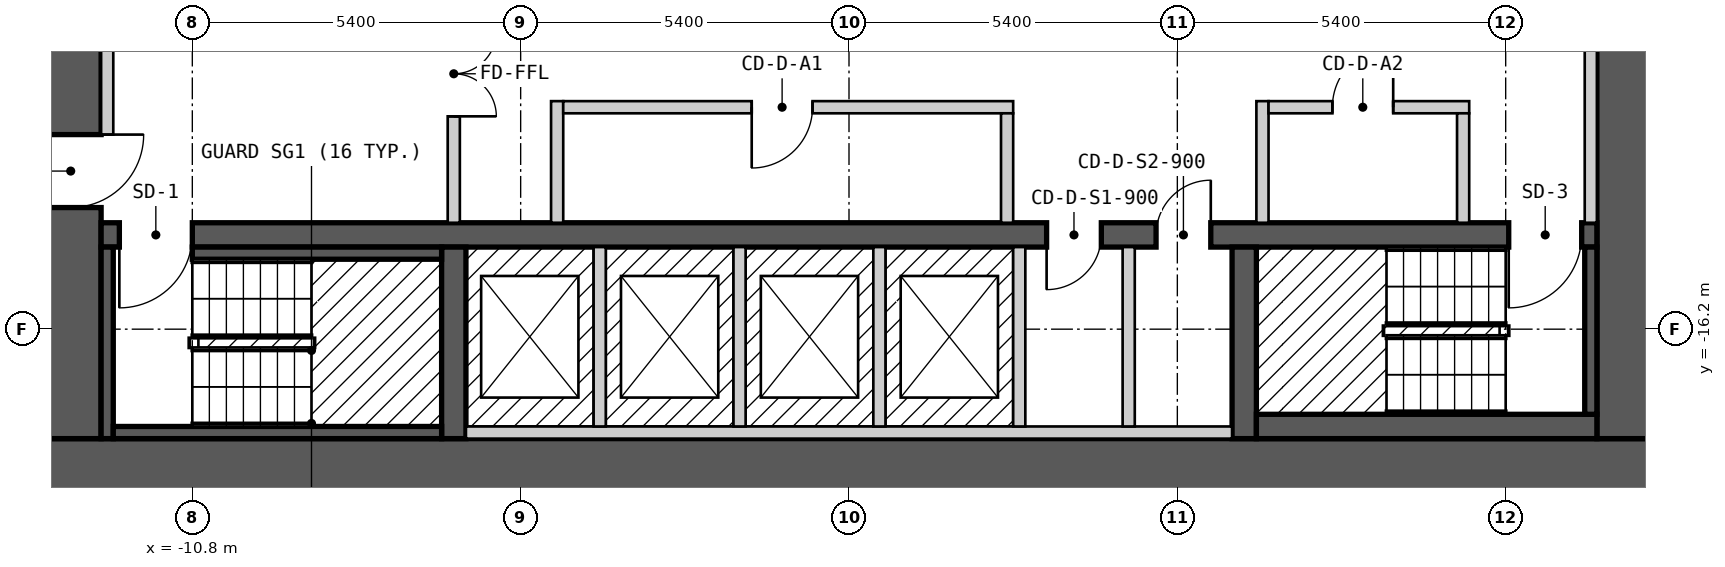
"""IFC4 building model, lengths in metres.
Left out: names, types, materials, properties, quantities, classifications, styles, units other than length and angle.
Written with IfcOpenShell. Run it as: python <this file> out.ifc"""

import sys

from ifc_helpers import new_model, si_unit, direction, frame, frame_2d, origin, place, context, subcontext, project, spatial, rectangle, extrude, element, fill, save


model = new_model("IFC4")
c1 = context("Model", 3, precision=1e-05, world=origin(), true_north=direction((0.0, 1.0)))
c2 = subcontext(c1, "Body", "Model", "MODEL_VIEW")
j1 = project(units=[si_unit("LENGTHUNIT", "METRE"), si_unit("PLANEANGLEUNIT", "RADIAN")], contexts=[c1])
p1 = place(None, origin())
s1 = spatial("IfcSite", under=j1, at=p1, CompositionType="ELEMENT")
p2 = place(p1, origin())
s2 = spatial("IfcBuilding", under=s1, at=p2, CompositionType="ELEMENT")
p3 = place(p2, frame((0.0, 0.0, 84.0)))
s3 = spatial("IfcBuildingStorey", under=s2, at=p3, CompositionType="ELEMENT", Elevation=84.0)
p4 = place(p3, frame((-13.3, -18.5, 0.0), z_axis=(0.0, 0.0, 1.0), x_axis=(1.0, 0.0, 0.0)))
e1 = element("IfcWall", 1, at=p4, inside=s3, PredefinedType="SHEAR", context=c2, shape_type="SweptSolid", body=[
    extrude(rectangle(XDim=26.6, YDim=1.0, at=frame_2d((13.3, 0.0))), origin(), (0.0, 0.0, 1.0), 2.7),
])
p5 = place(p3, frame((-12.8, -18.0, 0.0), z_axis=(0.0, 0.0, 1.0), x_axis=(0.0, 1.0, 0.0)))
e2 = element("IfcWall", 2, at=p5, inside=s3, PredefinedType="SHEAR", context=c2, shape_type="SweptSolid", body=[
    extrude(rectangle(XDim=12.0, YDim=1.0, at=frame_2d((6.0, 0.0))), origin(), (0.0, 0.0, 1.0), 2.7),
])
p6 = place(p5, frame((3.8, 0.0, 0.0)))
e3 = element("IfcOpeningElement", 3, at=p6, cuts=e2, PredefinedType="OPENING", context=c2, shape_type="SweptSolid", body=[
    extrude(rectangle(XDim=1.2, YDim=2.1, at=frame_2d((0.6, 1.05))), frame((0.0, 0.51, 0.0), z_axis=(0.0, -1.0, 0.0), x_axis=(1.0, 0.0, 0.0)), (0.0, 0.0, 1.0), 1.02),
])
p7 = place(p3, frame((12.8, -18.0, 0.0), z_axis=(0.0, 0.0, 1.0), x_axis=(0.0, 1.0, 0.0)))
e4 = element("IfcWall", 4, at=p7, inside=s3, PredefinedType="SHEAR", context=c2, shape_type="SweptSolid", body=[
    extrude(rectangle(XDim=12.0, YDim=1.0, at=frame_2d((6.0, 0.0))), origin(), (0.0, 0.0, 1.0), 2.7),
])
p8 = place(p3, frame((-12.3, -14.65, 0.0), z_axis=(0.0, 0.0, 1.0), x_axis=(1.0, 0.0, 0.0)))
e5 = element("IfcWall", 5, at=p8, inside=s3, PredefinedType="SHEAR", context=c2, shape_type="SweptSolid", body=[
    extrude(rectangle(XDim=24.6, YDim=0.4, at=frame_2d((12.3, 0.0))), origin(), (0.0, 0.0, 1.0), 2.7),
])
p9 = place(p8, frame((1.5, 0.0, 0.0), z_axis=(0.0, 0.0, 1.0), x_axis=(-1.0, 0.0, 0.0)))
e6 = element("IfcOpeningElement", 6, at=p9, cuts=e5, PredefinedType="OPENING", context=c2, shape_type="SweptSolid", body=[
    extrude(rectangle(XDim=1.2, YDim=2.1, at=frame_2d((0.6, 1.05))), frame((0.0, 0.21, 0.0), z_axis=(0.0, -1.0, 0.0), x_axis=(1.0, 0.0, 0.0)), (0.0, 0.0, 1.0), 0.42),
])
p10 = place(p8, frame((24.35, 0.0, 0.0), z_axis=(0.0, 0.0, 1.0), x_axis=(-1.0, 0.0, 0.0)))
e7 = element("IfcOpeningElement", 7, at=p10, cuts=e5, PredefinedType="OPENING", context=c2, shape_type="SweptSolid", body=[
    extrude(rectangle(XDim=1.2, YDim=2.1, at=frame_2d((0.6, 1.05))), frame((0.0, 0.21, 0.0), z_axis=(0.0, -1.0, 0.0), x_axis=(1.0, 0.0, 0.0)), (0.0, 0.0, 1.0), 0.42),
])
p11 = place(p8, frame((16.45, 0.0, 0.0), z_axis=(0.0, 0.0, 1.0), x_axis=(-1.0, 0.0, 0.0)))
e8 = element("IfcOpeningElement", 8, at=p11, cuts=e5, PredefinedType="OPENING", context=c2, shape_type="SweptSolid", body=[
    extrude(rectangle(XDim=0.9, YDim=2.1, at=frame_2d((0.45, 1.05))), frame((0.0, 0.21, 0.0), z_axis=(0.0, -1.0, 0.0), x_axis=(1.0, 0.0, 0.0)), (0.0, 0.0, 1.0), 0.42),
])
p12 = place(p8, frame((18.25, 0.0, 0.0), z_axis=(0.0, 0.0, 1.0), x_axis=(-1.0, 0.0, 0.0)))
e9 = element("IfcOpeningElement", 9, at=p12, cuts=e5, PredefinedType="OPENING", context=c2, shape_type="SweptSolid", body=[
    extrude(rectangle(XDim=0.9, YDim=2.1, at=frame_2d((0.45, 1.05))), frame((0.0, 0.21, 0.0), z_axis=(0.0, -1.0, 0.0), x_axis=(1.0, 0.0, 0.0)), (0.0, 0.0, 1.0), 0.42),
])
for number, where, z_axis, x_axis in (
    (10, (-6.5, -18.0, 0.0), (0.0, 0.0, 1.0), (0.0, 1.0, 0.0)),
    (11, (6.5, -18.0, 0.0), (0.0, 0.0, 1.0), (0.0, 1.0, 0.0)),
):
    element("IfcWall", number, at=place(p3, frame(where, z_axis=z_axis, x_axis=x_axis)), inside=s3, PredefinedType="SHEAR", context=c2, shape_type="SweptSolid", body=[
        extrude(rectangle(XDim=3.15, YDim=0.4, at=frame_2d((1.575, 0.0))), origin(), (0.0, 0.0, 1.0), 2.7),
    ])
p13 = place(p3, frame((-12.2, -18.0, 0.0), z_axis=(0.0, 0.0, 1.0), x_axis=(0.0, 1.0, 0.0)))
e12 = element("IfcWall", 12, at=p13, inside=s3, PredefinedType="SOLIDWALL", context=c2, shape_type="SweptSolid", body=[
    extrude(rectangle(XDim=3.15, YDim=0.2, at=frame_2d((1.575, 0.0))), origin(), (0.0, 0.0, 1.0), 2.7),
])
p14 = place(p3, frame((-12.2, -13.0, 0.0), z_axis=(0.0, 0.0, 1.0), x_axis=(0.0, 1.0, 0.0)))
e13 = element("IfcWall", 13, at=p14, inside=s3, PredefinedType="PARTITIONING", context=c2, shape_type="SweptSolid", body=[
    extrude(rectangle(XDim=3.45, YDim=0.2, at=frame_2d((1.725, 0.0))), origin(), (0.0, 0.0, 1.0), 2.7),
])
p15 = place(p3, frame((-12.1, -17.9, 0.0), z_axis=(0.0, 0.0, 1.0), x_axis=(1.0, 0.0, 0.0)))
e14 = element("IfcWall", 14, at=p15, inside=s3, PredefinedType="SOLIDWALL", context=c2, shape_type="SweptSolid", body=[
    extrude(rectangle(XDim=5.4, YDim=0.2, at=frame_2d((2.7, 0.0))), origin(), (0.0, 0.0, 1.0), 2.7),
])
p16 = place(p3, frame((-10.8, -14.95, 0.0), z_axis=(0.0, 0.0, 1.0), x_axis=(1.0, 0.0, 0.0)))
e15 = element("IfcWall", 15, at=p16, inside=s3, PredefinedType="SOLIDWALL", context=c2, shape_type="SweptSolid", body=[
    extrude(rectangle(XDim=4.1, YDim=0.2, at=frame_2d((2.05, 0.0))), origin(), (0.0, 0.0, 1.0), 2.7),
])
p17 = place(p3, frame((-6.5, -14.45, 0.0), z_axis=(0.0, 0.0, 1.0), x_axis=(0.0, 1.0, 0.0)))
e16 = element("IfcWall", 16, at=p17, inside=s3, PredefinedType="PARTITIONING", context=c2, shape_type="SweptSolid", body=[
    extrude(rectangle(XDim=4.9, YDim=0.2, at=frame_2d((2.45, 0.0))), origin(), (0.0, 0.0, 1.0), 2.7),
])
p18 = place(p17, frame((3.15, 0.0, 0.0), z_axis=(0.0, 0.0, 1.0), x_axis=(-1.0, 0.0, 0.0)))
e17 = element("IfcOpeningElement", 17, at=p18, cuts=e16, PredefinedType="OPENING", context=c2, shape_type="SweptSolid", body=[
    extrude(rectangle(XDim=1.4, YDim=2.1, at=frame_2d((0.7, 1.05))), frame((0.0, 0.11, 0.0), z_axis=(0.0, -1.0, 0.0), x_axis=(1.0, 0.0, 0.0)), (0.0, 0.0, 1.0), 0.22),
])
p19 = place(p3, frame((-6.3, -17.9, 0.0), z_axis=(0.0, 0.0, 1.0), x_axis=(1.0, 0.0, 0.0)))
e18 = element("IfcWall", 18, at=p19, inside=s3, PredefinedType="SOLIDWALL", context=c2, shape_type="SweptSolid", body=[
    extrude(rectangle(XDim=12.6, YDim=0.2, at=frame_2d((6.3, 0.0))), origin(), (0.0, 0.0, 1.0), 2.7),
])
p20 = place(p3, frame((-4.8, -14.45, 0.0), z_axis=(0.0, 0.0, 1.0), x_axis=(0.0, 1.0, 0.0)))
e19 = element("IfcWall", 19, at=p20, inside=s3, PredefinedType="PARTITIONING", context=c2, shape_type="SweptSolid", body=[
    extrude(rectangle(XDim=2.0, YDim=0.2, at=frame_2d((1.0, 0.0))), origin(), (0.0, 0.0, 1.0), 2.7),
])
p21 = place(p3, frame((-4.7, -12.55, 0.0), z_axis=(0.0, 0.0, 1.0), x_axis=(1.0, 0.0, 0.0)))
e20 = element("IfcWall", 20, at=p21, inside=s3, PredefinedType="PARTITIONING", context=c2, shape_type="SweptSolid", body=[
    extrude(rectangle(XDim=7.4, YDim=0.2, at=frame_2d((3.7, 0.0))), origin(), (0.0, 0.0, 1.0), 2.7),
])
p22 = place(p21, frame((4.1, 0.0, 0.0), z_axis=(0.0, 0.0, 1.0), x_axis=(-1.0, 0.0, 0.0)))
e21 = element("IfcOpeningElement", 21, at=p22, cuts=e20, PredefinedType="OPENING", context=c2, shape_type="SweptSolid", body=[
    extrude(rectangle(XDim=1.0, YDim=2.1, at=frame_2d((0.5, 1.05))), frame((0.0, 0.11, 0.0), z_axis=(0.0, -1.0, 0.0), x_axis=(1.0, 0.0, 0.0)), (0.0, 0.0, 1.0), 0.22),
])
for number, where, z_axis, x_axis in (
    (22, (-4.1, -17.8, 0.0), (0.0, 0.0, 1.0), (0.0, 1.0, 0.0)),
    (23, (-1.8, -17.8, 0.0), (0.0, 0.0, 1.0), (0.0, 1.0, 0.0)),
    (24, (0.5, -17.8, 0.0), (0.0, 0.0, 1.0), (0.0, 1.0, 0.0)),
):
    element("IfcWall", number, at=place(p3, frame(where, z_axis=z_axis, x_axis=x_axis)), inside=s3, PredefinedType="SOLIDWALL", context=c2, shape_type="SweptSolid", body=[
        extrude(rectangle(XDim=2.95, YDim=0.2, at=frame_2d((1.475, 0.0))), origin(), (0.0, 0.0, 1.0), 2.7),
    ])
p23 = place(p3, frame((2.6, -14.45, 0.0), z_axis=(0.0, 0.0, 1.0), x_axis=(0.0, 1.0, 0.0)))
e25 = element("IfcWall", 25, at=p23, inside=s3, PredefinedType="PARTITIONING", context=c2, shape_type="SweptSolid", body=[
    extrude(rectangle(XDim=1.8, YDim=0.2, at=frame_2d((0.9, 0.0))), origin(), (0.0, 0.0, 1.0), 2.7),
])
p24 = place(p3, frame((2.8, -17.8, 0.0), z_axis=(0.0, 0.0, 1.0), x_axis=(0.0, 1.0, 0.0)))
e26 = element("IfcWall", 26, at=p24, inside=s3, PredefinedType="SOLIDWALL", context=c2, shape_type="SweptSolid", body=[
    extrude(rectangle(XDim=2.95, YDim=0.2, at=frame_2d((1.475, 0.0))), origin(), (0.0, 0.0, 1.0), 2.7),
])
p25 = place(p3, frame((4.6, -17.8, 0.0), z_axis=(0.0, 0.0, 1.0), x_axis=(0.0, 1.0, 0.0)))
e27 = element("IfcWall", 27, at=p25, inside=s3, PredefinedType="PARTITIONING", context=c2, shape_type="SweptSolid", body=[
    extrude(rectangle(XDim=2.95, YDim=0.2, at=frame_2d((1.475, 0.0))), origin(), (0.0, 0.0, 1.0), 2.7),
])
p26 = place(p3, frame((6.7, -17.8, 0.0), z_axis=(0.0, 0.0, 1.0), x_axis=(1.0, 0.0, 0.0)))
e28 = element("IfcWall", 28, at=p26, inside=s3, PredefinedType="SOLIDWALL", context=c2, shape_type="SweptSolid", body=[
    extrude(rectangle(XDim=5.6, YDim=0.4, at=frame_2d((2.8, 0.0))), origin(), (0.0, 0.0, 1.0), 2.7),
])
p27 = place(p3, frame((6.8, -14.45, 0.0), z_axis=(0.0, 0.0, 1.0), x_axis=(0.0, 1.0, 0.0)))
e29 = element("IfcWall", 29, at=p27, inside=s3, PredefinedType="PARTITIONING", context=c2, shape_type="SweptSolid", body=[
    extrude(rectangle(XDim=2.0, YDim=0.2, at=frame_2d((1.0, 0.0))), origin(), (0.0, 0.0, 1.0), 2.7),
])
p28 = place(p3, frame((6.9, -12.55, 0.0), z_axis=(0.0, 0.0, 1.0), x_axis=(1.0, 0.0, 0.0)))
e30 = element("IfcWall", 30, at=p28, inside=s3, PredefinedType="PARTITIONING", context=c2, shape_type="SweptSolid", body=[
    extrude(rectangle(XDim=3.3, YDim=0.2, at=frame_2d((1.65, 0.0))), origin(), (0.0, 0.0, 1.0), 2.7),
])
p29 = place(p28, frame((2.05, 0.0, 0.0), z_axis=(0.0, 0.0, 1.0), x_axis=(-1.0, 0.0, 0.0)))
e31 = element("IfcOpeningElement", 31, at=p29, cuts=e30, PredefinedType="OPENING", context=c2, shape_type="SweptSolid", body=[
    extrude(rectangle(XDim=1.0, YDim=2.1, at=frame_2d((0.5, 1.05))), frame((0.0, 0.11, 0.0), z_axis=(0.0, -1.0, 0.0), x_axis=(1.0, 0.0, 0.0)), (0.0, 0.0, 1.0), 0.22),
])
p30 = place(p3, frame((10.1, -14.45, 0.0), z_axis=(0.0, 0.0, 1.0), x_axis=(0.0, 1.0, 0.0)))
e32 = element("IfcWall", 32, at=p30, inside=s3, PredefinedType="PARTITIONING", context=c2, shape_type="SweptSolid", body=[
    extrude(rectangle(XDim=1.8, YDim=0.2, at=frame_2d((0.9, 0.0))), origin(), (0.0, 0.0, 1.0), 2.7),
])
p31 = place(p3, frame((12.2, -17.6, 0.0), z_axis=(0.0, 0.0, 1.0), x_axis=(0.0, 1.0, 0.0)))
e33 = element("IfcWall", 33, at=p31, inside=s3, PredefinedType="SOLIDWALL", context=c2, shape_type="SweptSolid", body=[
    extrude(rectangle(XDim=2.75, YDim=0.2, at=frame_2d((1.375, 0.0))), origin(), (0.0, 0.0, 1.0), 2.7),
])
p32 = place(p3, frame((12.2, -14.45, 0.0), z_axis=(0.0, 0.0, 1.0), x_axis=(0.0, 1.0, 0.0)))
e34 = element("IfcWall", 34, at=p32, inside=s3, PredefinedType="PARTITIONING", context=c2, shape_type="SweptSolid", body=[
    extrude(rectangle(XDim=8.25, YDim=0.2, at=frame_2d((4.125, 0.0))), origin(), (0.0, 0.0, 1.0), 2.7),
])
p33 = place(p9, origin())
e35 = element("IfcDoor", 35, at=p33, inside=s3, OperationType="SINGLE_SWING_RIGHT", PredefinedType="DOOR", context=c2, shape_type="SweptSolid", body=[
    extrude(rectangle(XDim=1.2, YDim=2.1, at=frame_2d((0.6, 1.05))), frame((0.0, 0.025, 0.0), z_axis=(0.0, -1.0, 0.0), x_axis=(1.0, 0.0, 0.0)), (0.0, 0.0, 1.0), 0.05),
])
fill(e6, e35)
p34 = place(p10, origin())
e36 = element("IfcDoor", 36, at=p34, inside=s3, OperationType="SINGLE_SWING_RIGHT", PredefinedType="DOOR", context=c2, shape_type="SweptSolid", body=[
    extrude(rectangle(XDim=1.2, YDim=2.1, at=frame_2d((0.6, 1.05))), frame((0.0, 0.025, 0.0), z_axis=(0.0, -1.0, 0.0), x_axis=(1.0, 0.0, 0.0)), (0.0, 0.0, 1.0), 0.05),
])
fill(e7, e36)
p35 = place(p6, origin())
e37 = element("IfcDoor", 37, at=p35, inside=s3, OperationType="SINGLE_SWING_RIGHT", PredefinedType="DOOR", context=c2, shape_type="SweptSolid", body=[
    extrude(rectangle(XDim=1.2, YDim=2.1, at=frame_2d((0.6, 1.05))), frame((0.0, 0.025, 0.0), z_axis=(0.0, -1.0, 0.0), x_axis=(1.0, 0.0, 0.0)), (0.0, 0.0, 1.0), 0.05),
])
fill(e3, e37)
p36 = place(p18, origin())
e38 = element("IfcDoor", 38, at=p36, inside=s3, OperationType="DOUBLE_DOOR_SINGLE_SWING", PredefinedType="DOOR", context=c2, shape_type="SweptSolid", body=[
    extrude(rectangle(XDim=1.4, YDim=2.1, at=frame_2d((0.7, 1.05))), frame((0.0, 0.025, 0.0), z_axis=(0.0, -1.0, 0.0), x_axis=(1.0, 0.0, 0.0)), (0.0, 0.0, 1.0), 0.05),
])
fill(e17, e38)
p37 = place(p22, origin())
e39 = element("IfcDoor", 39, at=p37, inside=s3, OperationType="SINGLE_SWING_RIGHT", PredefinedType="DOOR", context=c2, shape_type="SweptSolid", body=[
    extrude(rectangle(XDim=1.0, YDim=2.1, at=frame_2d((0.5, 1.05))), frame((0.0, 0.025, 0.0), z_axis=(0.0, -1.0, 0.0), x_axis=(1.0, 0.0, 0.0)), (0.0, 0.0, 1.0), 0.05),
])
fill(e21, e39)
p38 = place(p29, origin())
e40 = element("IfcDoor", 40, at=p38, inside=s3, OperationType="SINGLE_SWING_LEFT", PredefinedType="DOOR", context=c2, shape_type="SweptSolid", body=[
    extrude(rectangle(XDim=1.0, YDim=2.1, at=frame_2d((0.5, 1.05))), frame((0.0, 0.025, 0.0), z_axis=(0.0, -1.0, 0.0), x_axis=(1.0, 0.0, 0.0)), (0.0, 0.0, 1.0), 0.05),
])
fill(e31, e40)
p39 = place(p11, origin())
e41 = element("IfcDoor", 41, at=p39, inside=s3, OperationType="SINGLE_SWING_RIGHT", PredefinedType="DOOR", context=c2, shape_type="SweptSolid", body=[
    extrude(rectangle(XDim=0.9, YDim=2.1, at=frame_2d((0.45, 1.05))), frame((0.0, 0.025, 0.0), z_axis=(0.0, -1.0, 0.0), x_axis=(1.0, 0.0, 0.0)), (0.0, 0.0, 1.0), 0.05),
])
fill(e8, e41)
p40 = place(p12, origin())
e42 = element("IfcDoor", 42, at=p40, inside=s3, OperationType="SINGLE_SWING_LEFT", PredefinedType="DOOR", context=c2, shape_type="SweptSolid", body=[
    extrude(rectangle(XDim=0.9, YDim=2.1, at=frame_2d((0.45, 1.05))), frame((0.0, 0.025, 0.0), z_axis=(0.0, -1.0, 0.0), x_axis=(1.0, 0.0, 0.0)), (0.0, 0.0, 1.0), 0.05),
])
fill(e9, e42)
save(model, sys.argv[1])
